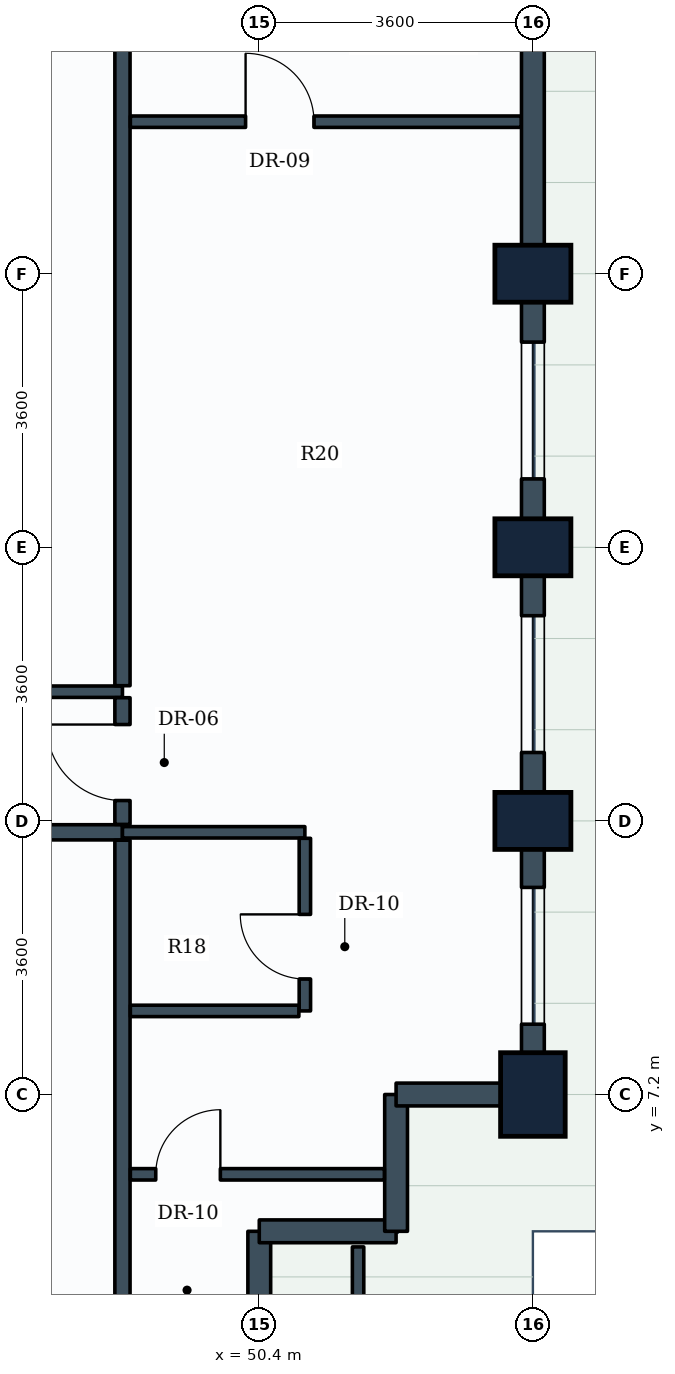
"""IFC4 building model, lengths in metres.
Left out: names, types, materials, properties, quantities, classifications, styles, units other than length and angle.
Written with IfcOpenShell. Run it as: python <this file> out.ifc"""

import sys

from ifc_helpers import new_model, si_unit, direction, frame, frame_2d, origin, origin_2d, place, context, subcontext, project, spatial, rectangle, extrude, element, fill, save


model = new_model("IFC4")
c1 = context("Model", 3, precision=1e-05, world=origin(), true_north=direction((0.0, 1.0)))
c2 = subcontext(c1, "Body", "Model", "MODEL_VIEW")
j1 = project(units=[si_unit("LENGTHUNIT", "METRE"), si_unit("PLANEANGLEUNIT", "RADIAN")], contexts=[c1])
p1 = place(None, origin())
s1 = spatial("IfcSite", under=j1, at=p1, CompositionType="ELEMENT")
p2 = place(p1, origin())
s2 = spatial("IfcBuilding", under=s1, at=p2, CompositionType="ELEMENT")
p3 = place(p2, frame((0.0, 0.0, 127.6)))
s3 = spatial("IfcBuildingStorey", under=s2, at=p3, CompositionType="ELEMENT", Elevation=127.6)
p4 = place(p3, frame((54.0, 7.2, 0.0), z_axis=(0.0, 0.0, 1.0), x_axis=(1.0, 0.0, 0.0)))
e1 = element("IfcColumn", 1, at=p4, inside=s3, PredefinedType="COLUMN", context=c2, shape_type="SweptSolid", body=[
    extrude(rectangle(XDim=0.85, YDim=1.1, at=origin_2d()), origin(), (0.0, 0.0, 1.0), 3.8),
])
for number, where, z_axis, x_axis in (
    (2, (54.0, 10.8, 0.0), (0.0, 0.0, 1.0), (0.0, 1.0, 0.0)),
    (3, (54.0, 14.4, 0.0), (0.0, 0.0, 1.0), (0.0, 1.0, 0.0)),
    (4, (54.0, 18.0, 0.0), (0.0, 0.0, 1.0), (0.0, 1.0, 0.0)),
):
    element("IfcColumn", number, at=place(p3, frame(where, z_axis=z_axis, x_axis=x_axis)), inside=s3, PredefinedType="COLUMN", context=c2, shape_type="SweptSolid", body=[
        extrude(rectangle(XDim=0.75, YDim=1.0, at=origin_2d()), origin(), (0.0, 0.0, 1.0), 3.8),
    ])
p5 = place(p3, frame((50.4, 5.4, 0.0), z_axis=(0.0, 0.0, 1.0), x_axis=(0.0, -1.0, 0.0)))
e5 = element("IfcWall", 5, at=p5, inside=s3, PredefinedType="STANDARD", context=c2, shape_type="SweptSolid", body=[
    extrude(rectangle(XDim=1.8, YDim=0.3, at=frame_2d((0.9, 0.0))), origin(), (0.0, 0.0, 1.0), 2.93),
])
for number, where, z_axis, x_axis in (
    (6, (52.2, 5.4, 0.0), (0.0, 0.0, 1.0), (-1.0, 0.0, 0.0)),
    (7, (52.2, 7.2, 0.0), (0.0, 0.0, 1.0), (0.0, -1.0, 0.0)),
):
    element("IfcWall", number, at=place(p3, frame(where, z_axis=z_axis, x_axis=x_axis)), inside=s3, PredefinedType="STANDARD", context=c2, shape_type="SweptSolid", body=[
        extrude(rectangle(XDim=1.8, YDim=0.3, at=frame_2d((0.9, 0.0))), origin(), (0.0, 0.0, 1.0), 3.535),
    ])
p6 = place(p3, frame((54.0, 7.2, 0.0), z_axis=(0.0, 0.0, 1.0), x_axis=(-1.0, 0.0, 0.0)))
e8 = element("IfcWall", 8, at=p6, inside=s3, PredefinedType="STANDARD", context=c2, shape_type="SweptSolid", body=[
    extrude(rectangle(XDim=1.8, YDim=0.3, at=frame_2d((0.9, 0.0))), origin(), (0.0, 0.0, 1.0), 2.93),
])
p7 = place(p3, frame((54.0, 10.8, 0.0), z_axis=(0.0, 0.0, 1.0), x_axis=(0.0, -1.0, 0.0)))
e9 = element("IfcWall", 9, at=p7, inside=s3, PredefinedType="STANDARD", context=c2, shape_type="SweptSolid", body=[
    extrude(rectangle(XDim=3.6, YDim=0.3, at=frame_2d((1.8, 0.0))), origin(), (0.0, 0.0, 1.0), 2.93),
])
p8 = place(p7, frame((0.875, 0.0, 0.85)))
e10 = element("IfcOpeningElement", 10, at=p8, cuts=e9, PredefinedType="OPENING", context=c2, shape_type="SweptSolid", body=[
    extrude(rectangle(XDim=1.8, YDim=1.35, at=frame_2d((0.9, 0.675))), frame((0.0, 0.16, 0.0), z_axis=(0.0, -1.0, 0.0), x_axis=(1.0, 0.0, 0.0)), (0.0, 0.0, 1.0), 0.32),
])
p9 = place(p3, frame((54.0, 14.4, 0.0), z_axis=(0.0, 0.0, 1.0), x_axis=(0.0, -1.0, 0.0)))
e11 = element("IfcWall", 11, at=p9, inside=s3, PredefinedType="STANDARD", context=c2, shape_type="SweptSolid", body=[
    extrude(rectangle(XDim=3.6, YDim=0.3, at=frame_2d((1.8, 0.0))), origin(), (0.0, 0.0, 1.0), 2.93),
])
p10 = place(p9, frame((0.9, 0.0, 0.85)))
e12 = element("IfcOpeningElement", 12, at=p10, cuts=e11, PredefinedType="OPENING", context=c2, shape_type="SweptSolid", body=[
    extrude(rectangle(XDim=1.8, YDim=1.35, at=frame_2d((0.9, 0.675))), frame((0.0, 0.16, 0.0), z_axis=(0.0, -1.0, 0.0), x_axis=(1.0, 0.0, 0.0)), (0.0, 0.0, 1.0), 0.32),
])
p11 = place(p3, frame((54.0, 18.0, 0.0), z_axis=(0.0, 0.0, 1.0), x_axis=(0.0, -1.0, 0.0)))
e13 = element("IfcWall", 13, at=p11, inside=s3, PredefinedType="STANDARD", context=c2, shape_type="SweptSolid", body=[
    extrude(rectangle(XDim=3.6, YDim=0.3, at=frame_2d((1.8, 0.0))), origin(), (0.0, 0.0, 1.0), 2.93),
])
p12 = place(p11, frame((0.9, 0.0, 0.85)))
e14 = element("IfcOpeningElement", 14, at=p12, cuts=e13, PredefinedType="OPENING", context=c2, shape_type="SweptSolid", body=[
    extrude(rectangle(XDim=1.8, YDim=1.35, at=frame_2d((0.9, 0.675))), frame((0.0, 0.16, 0.0), z_axis=(0.0, -1.0, 0.0), x_axis=(1.0, 0.0, 0.0)), (0.0, 0.0, 1.0), 0.32),
])
p13 = place(p3, frame((54.0, 21.6, 0.0), z_axis=(0.0, 0.0, 1.0), x_axis=(0.0, -1.0, 0.0)))
e15 = element("IfcWall", 15, at=p13, inside=s3, PredefinedType="STANDARD", context=c2, shape_type="SweptSolid", body=[
    extrude(rectangle(XDim=3.6, YDim=0.3, at=frame_2d((1.8, 0.0))), origin(), (0.0, 0.0, 1.0), 2.93),
])
p14 = place(p3, frame((45.05, 10.65, 0.0), z_axis=(0.0, 0.0, 1.0), x_axis=(1.0, 0.0, 0.0)))
e16 = element("IfcWall", 16, at=p14, inside=s3, PredefinedType="PARTITIONING", context=c2, shape_type="SweptSolid", body=[
    extrude(rectangle(XDim=3.55, YDim=0.2, at=frame_2d((1.775, 0.0))), origin(), (0.0, 0.0, 1.0), 3.17),
])
p15 = place(p3, frame((43.904, 12.5, 0.0), z_axis=(0.0, 0.0, 1.0), x_axis=(1.0, 0.0, 0.0)))
e17 = element("IfcWall", 17, at=p15, inside=s3, PredefinedType="PARTITIONING", context=c2, shape_type="SweptSolid", body=[
    extrude(rectangle(XDim=4.696, YDim=0.15, at=frame_2d((2.348, 0.0))), origin(), (0.0, 0.0, 1.0), 3.17),
])
p16 = place(p15, frame((1.835, 0.0, 0.0)))
e18 = element("IfcOpeningElement", 18, at=p16, cuts=e17, PredefinedType="OPENING", context=c2, shape_type="SweptSolid", body=[
    extrude(rectangle(XDim=1.0, YDim=2.1, at=frame_2d((0.5, 1.05))), frame((0.0, 0.085, 0.0), z_axis=(0.0, -1.0, 0.0), x_axis=(1.0, 0.0, 0.0)), (0.0, 0.0, 1.0), 0.17),
])
p17 = place(p3, frame((48.6, 3.754, 0.0), z_axis=(0.0, 0.0, 1.0), x_axis=(0.0, 1.0, 0.0)))
e19 = element("IfcWall", 19, at=p17, inside=s3, PredefinedType="PARTITIONING", context=c2, shape_type="SweptSolid", body=[
    extrude(rectangle(XDim=6.792, YDim=0.2, at=frame_2d((3.396, 0.0))), origin(), (0.0, 0.0, 1.0), 2.93),
])
p18 = place(p3, frame((48.6, 12.579, 0.0), z_axis=(0.0, 0.0, 1.0), x_axis=(0.0, 1.0, 0.0)))
e20 = element("IfcWall", 20, at=p18, inside=s3, PredefinedType="PARTITIONING", context=c2, shape_type="SweptSolid", body=[
    extrude(rectangle(XDim=12.467, YDim=0.2, at=frame_2d((6.233, 0.0))), origin(), (0.0, 0.0, 1.0), 2.93),
])
p19 = place(p3, frame((48.6, 10.754, 0.0), z_axis=(0.0, 0.0, 1.0), x_axis=(0.0, 1.0, 0.0)))
e21 = element("IfcWall", 21, at=p19, inside=s3, PredefinedType="PARTITIONING", context=c2, shape_type="SweptSolid", body=[
    extrude(rectangle(XDim=1.667, YDim=0.2, at=frame_2d((0.833, 0.0))), origin(), (0.0, 0.0, 1.0), 3.535),
])
p20 = place(p19, frame((0.314, 0.0, 0.0)))
e22 = element("IfcOpeningElement", 22, at=p20, cuts=e21, PredefinedType="OPENING", context=c2, shape_type="SweptSolid", body=[
    extrude(rectangle(XDim=1.0, YDim=2.1, at=frame_2d((0.5, 1.05))), frame((0.0, 0.11, 0.0), z_axis=(0.0, -1.0, 0.0), x_axis=(1.0, 0.0, 0.0)), (0.0, 0.0, 1.0), 0.22),
])
p21 = place(p3, frame((48.6, 10.65, 0.0), z_axis=(0.0, 0.0, 1.0), x_axis=(1.0, 0.0, 0.0)))
e23 = element("IfcWall", 23, at=p21, inside=s3, PredefinedType="PARTITIONING", context=c2, shape_type="SweptSolid", body=[
    extrude(rectangle(XDim=2.4, YDim=0.15, at=frame_2d((1.2, 0.0))), origin(), (0.0, 0.0, 1.0), 3.535),
])
p22 = place(p3, frame((51.0, 8.3, 0.0), z_axis=(0.0, 0.0, 1.0), x_axis=(0.0, 1.0, 0.0)))
e24 = element("IfcWall", 24, at=p22, inside=s3, PredefinedType="PARTITIONING", context=c2, shape_type="SweptSolid", body=[
    extrude(rectangle(XDim=2.271, YDim=0.15, at=frame_2d((1.135, 0.0))), origin(), (0.0, 0.0, 1.0), 3.535),
])
p23 = place(p22, frame((0.42, 0.0, 0.0)))
e25 = element("IfcOpeningElement", 25, at=p23, cuts=e24, PredefinedType="OPENING", context=c2, shape_type="SweptSolid", body=[
    extrude(rectangle(XDim=0.85, YDim=2.1, at=frame_2d((0.425, 1.05))), frame((0.0, 0.085, 0.0), z_axis=(0.0, -1.0, 0.0), x_axis=(1.0, 0.0, 0.0)), (0.0, 0.0, 1.0), 0.17),
])
p24 = place(p3, frame((48.704, 8.3, 0.0), z_axis=(0.0, 0.0, 1.0), x_axis=(1.0, 0.0, 0.0)))
e26 = element("IfcWall", 26, at=p24, inside=s3, PredefinedType="PARTITIONING", context=c2, shape_type="SweptSolid", body=[
    extrude(rectangle(XDim=2.217, YDim=0.15, at=frame_2d((1.108, 0.0))), origin(), (0.0, 0.0, 1.0), 3.535),
])
p25 = place(p3, frame((48.704, 20.0, 0.0), z_axis=(0.0, 0.0, 1.0), x_axis=(1.0, 0.0, 0.0)))
e27 = element("IfcWall", 27, at=p25, inside=s3, PredefinedType="PARTITIONING", context=c2, shape_type="SweptSolid", body=[
    extrude(rectangle(XDim=5.142, YDim=0.15, at=frame_2d((2.571, 0.0))), origin(), (0.0, 0.0, 1.0), 2.93),
])
p26 = place(p25, frame((1.516, 0.0, 0.0)))
e28 = element("IfcOpeningElement", 28, at=p26, cuts=e27, PredefinedType="OPENING", context=c2, shape_type="SweptSolid", body=[
    extrude(rectangle(XDim=0.9, YDim=2.1, at=frame_2d((0.45, 1.05))), frame((0.0, 0.085, 0.0), z_axis=(0.0, -1.0, 0.0), x_axis=(1.0, 0.0, 0.0)), (0.0, 0.0, 1.0), 0.17),
])
p27 = place(p3, frame((48.704, 6.15, 0.0), z_axis=(0.0, 0.0, 1.0), x_axis=(1.0, 0.0, 0.0)))
e29 = element("IfcWall", 29, at=p27, inside=s3, PredefinedType="PARTITIONING", context=c2, shape_type="SweptSolid", body=[
    extrude(rectangle(XDim=3.342, YDim=0.15, at=frame_2d((1.671, 0.0))), origin(), (0.0, 0.0, 1.0), 3.535),
])
p28 = place(p27, frame((0.334, 0.0, 0.0)))
e30 = element("IfcOpeningElement", 30, at=p28, cuts=e29, PredefinedType="OPENING", context=c2, shape_type="SweptSolid", body=[
    extrude(rectangle(XDim=0.85, YDim=2.1, at=frame_2d((0.425, 1.05))), frame((0.0, 0.085, 0.0), z_axis=(0.0, -1.0, 0.0), x_axis=(1.0, 0.0, 0.0)), (0.0, 0.0, 1.0), 0.17),
])
p29 = place(p3, frame((51.7, 3.6, 0.0), z_axis=(0.0, 0.0, 1.0), x_axis=(0.0, 1.0, 0.0)))
e31 = element("IfcWall", 31, at=p29, inside=s3, PredefinedType="PARTITIONING", context=c2, shape_type="SweptSolid", body=[
    extrude(rectangle(XDim=1.595, YDim=0.15, at=frame_2d((0.797, 0.0))), origin(), (0.0, 0.0, 1.0), 3.535),
])
p30 = place(p8, origin())
e32 = element("IfcWindow", 32, at=p30, inside=s3, PartitioningType="SINGLE_PANEL", PredefinedType="WINDOW", context=c2, shape_type="SweptSolid", body=[
    extrude(rectangle(XDim=1.8, YDim=1.35, at=frame_2d((0.9, 0.675))), frame((0.0, 0.03, 0.0), z_axis=(0.0, -1.0, 0.0), x_axis=(1.0, 0.0, 0.0)), (0.0, 0.0, 1.0), 0.06),
])
fill(e10, e32)
p31 = place(p10, origin())
e33 = element("IfcWindow", 33, at=p31, inside=s3, PartitioningType="SINGLE_PANEL", PredefinedType="WINDOW", context=c2, shape_type="SweptSolid", body=[
    extrude(rectangle(XDim=1.8, YDim=1.35, at=frame_2d((0.9, 0.675))), frame((0.0, 0.03, 0.0), z_axis=(0.0, -1.0, 0.0), x_axis=(1.0, 0.0, 0.0)), (0.0, 0.0, 1.0), 0.06),
])
fill(e12, e33)
p32 = place(p12, origin())
e34 = element("IfcWindow", 34, at=p32, inside=s3, PartitioningType="SINGLE_PANEL", PredefinedType="WINDOW", context=c2, shape_type="SweptSolid", body=[
    extrude(rectangle(XDim=1.8, YDim=1.35, at=frame_2d((0.9, 0.675))), frame((0.0, 0.03, 0.0), z_axis=(0.0, -1.0, 0.0), x_axis=(1.0, 0.0, 0.0)), (0.0, 0.0, 1.0), 0.06),
])
fill(e14, e34)
p33 = place(p20, origin())
e35 = element("IfcDoor", 35, at=p33, inside=s3, OperationType="SINGLE_SWING_RIGHT", PredefinedType="DOOR", context=c2, shape_type="SweptSolid", body=[
    extrude(rectangle(XDim=1.0, YDim=2.1, at=frame_2d((0.5, 1.05))), frame((0.0, 0.025, 0.0), z_axis=(0.0, -1.0, 0.0), x_axis=(1.0, 0.0, 0.0)), (0.0, 0.0, 1.0), 0.05),
])
fill(e22, e35)
p34 = place(p23, origin())
e36 = element("IfcDoor", 36, at=p34, inside=s3, OperationType="SINGLE_SWING_RIGHT", PredefinedType="DOOR", context=c2, shape_type="SweptSolid", body=[
    extrude(rectangle(XDim=0.85, YDim=2.1, at=frame_2d((0.425, 1.05))), frame((0.0, 0.025, 0.0), z_axis=(0.0, -1.0, 0.0), x_axis=(1.0, 0.0, 0.0)), (0.0, 0.0, 1.0), 0.05),
])
fill(e25, e36)
p35 = place(p26, origin())
e37 = element("IfcDoor", 37, at=p35, inside=s3, OperationType="SINGLE_SWING_LEFT", PredefinedType="DOOR", context=c2, shape_type="SweptSolid", body=[
    extrude(rectangle(XDim=0.9, YDim=2.1, at=frame_2d((0.45, 1.05))), frame((0.0, 0.025, 0.0), z_axis=(0.0, -1.0, 0.0), x_axis=(1.0, 0.0, 0.0)), (0.0, 0.0, 1.0), 0.05),
])
fill(e28, e37)
p36 = place(p28, origin())
e38 = element("IfcDoor", 38, at=p36, inside=s3, OperationType="SINGLE_SWING_RIGHT", PredefinedType="DOOR", context=c2, shape_type="SweptSolid", body=[
    extrude(rectangle(XDim=0.85, YDim=2.1, at=frame_2d((0.425, 1.05))), frame((0.0, 0.025, 0.0), z_axis=(0.0, -1.0, 0.0), x_axis=(1.0, 0.0, 0.0)), (0.0, 0.0, 1.0), 0.05),
])
fill(e30, e38)
save(model, sys.argv[1])
